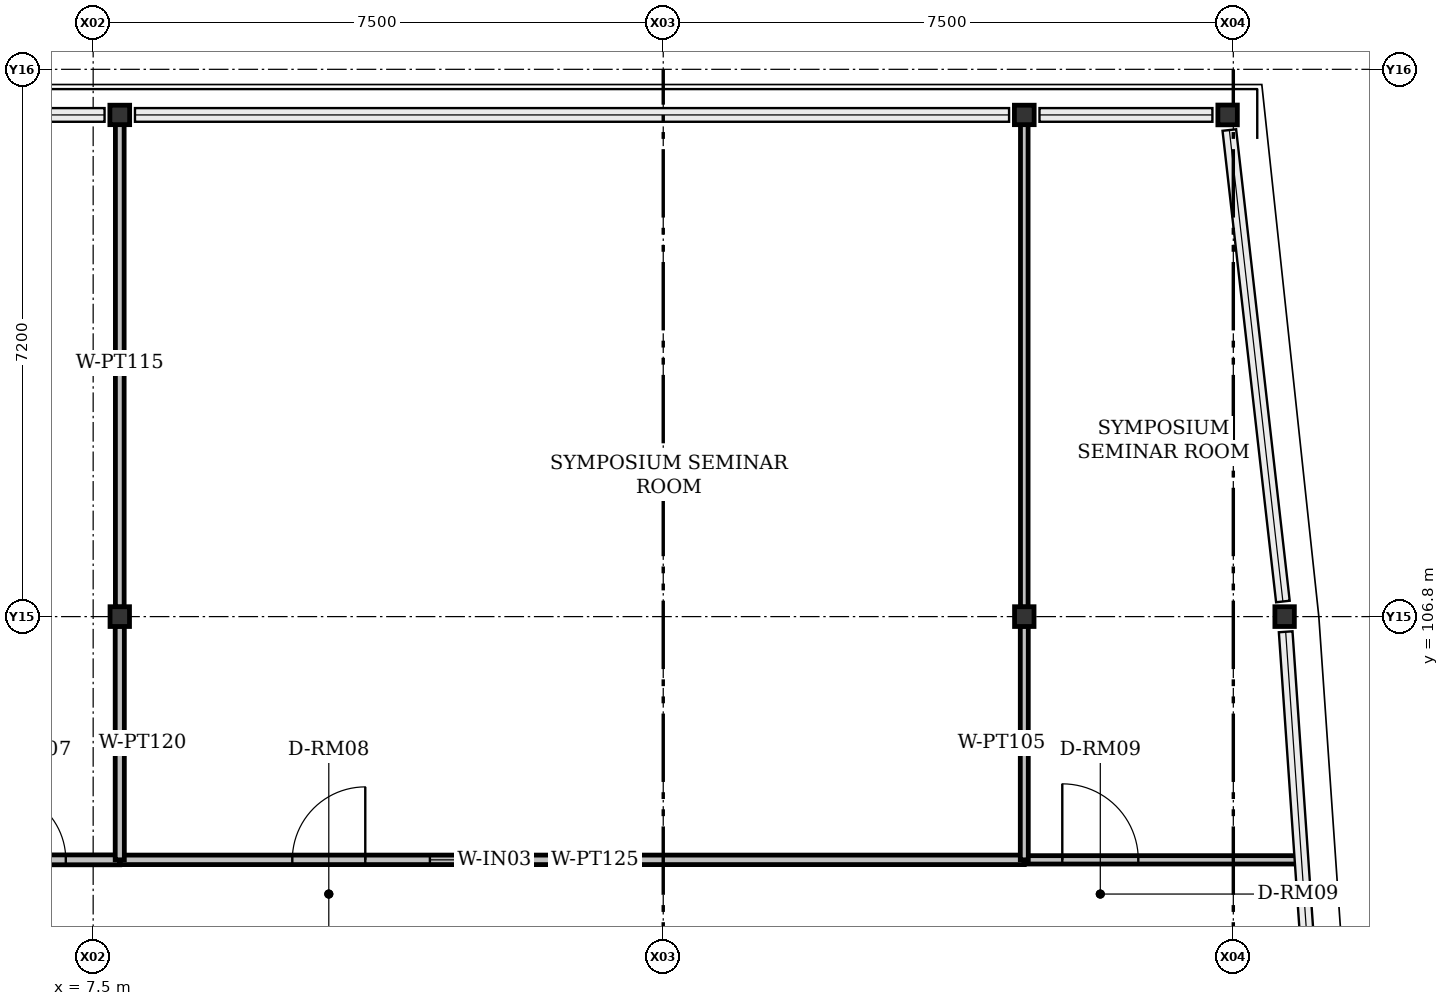
"""IFC4 building model, lengths in metres.
Left out: names, types, materials, properties, quantities, classifications, styles, units other than length and angle.
Written with IfcOpenShell. Run it as: python <this file> out.ifc"""

import sys

from ifc_helpers import new_model, si_unit, direction, frame, frame_2d, origin, origin_2d, place, context, subcontext, project, spatial, rectangle, i_section, extrude, element, fill, save


model = new_model("IFC4")
c1 = context("Model", 3, precision=1e-05, world=origin(), true_north=direction((0.0, 1.0)))
c2 = subcontext(c1, "Body", "Model", "MODEL_VIEW")
j1 = project(units=[si_unit("LENGTHUNIT", "METRE"), si_unit("PLANEANGLEUNIT", "RADIAN")], contexts=[c1])
p1 = place(None, origin())
s1 = spatial("IfcSite", under=j1, at=p1, CompositionType="ELEMENT")
p2 = place(p1, origin())
s2 = spatial("IfcBuilding", under=s1, at=p2, CompositionType="ELEMENT")
p3 = place(p2, frame((0.0, 0.0, 60.3)))
s3 = spatial("IfcBuildingStorey", under=s2, at=p3, CompositionType="ELEMENT", Elevation=60.3)
for number, where, z_axis, x_axis in (
    (1, (7.85, 106.8, 0.0), (0.0, 0.0, 1.0), (1.0, 0.0, 0.0)),
    (2, (19.75, 106.8, 0.0), (0.0, 0.0, 1.0), (1.0, 0.0, 0.0)),
    (3, (23.175, 106.8, 0.0), (0.0, 0.0, 1.0), (1.0, 0.0, 0.0)),
    (4, (7.85, 113.4, 0.0), (0.0, 0.0, 1.0), (0.0, 1.0, 0.0)),
    (5, (19.75, 113.4, 0.0), (0.0, 0.0, 1.0), (0.0, 1.0, 0.0)),
    (6, (22.425, 113.4, 0.0), (0.0, 0.0, 1.0), (1.0, 0.0, 0.0)),
):
    element("IfcColumn", number, at=place(p3, frame(where, z_axis=z_axis, x_axis=x_axis)), inside=s3, PredefinedType="COLUMN", context=c2, shape_type="SweptSolid", body=[
        extrude(i_section(OverallWidth=0.256, OverallDepth=0.26, WebThickness=0.011, FlangeThickness=0.017, FilletRadius=0.013, at=origin_2d()), origin(), (0.0, 0.0, 1.0), 4.2),
    ])
p4 = place(p3, frame((0.65, 103.6, 0.0), z_axis=(0.0, 0.0, 1.0), x_axis=(1.0, 0.0, 0.0)))
e7 = element("IfcWall", 7, at=p4, inside=s3, PredefinedType="PARTITIONING", context=c2, shape_type="SweptSolid", body=[
    extrude(rectangle(XDim=7.2, YDim=0.13, at=frame_2d((3.6, 0.0))), origin(), (0.0, 0.0, 1.0), 3.527),
])
p5 = place(p4, frame((5.57, 0.0, 0.0)))
e8 = element("IfcOpeningElement", 8, at=p5, cuts=e7, PredefinedType="OPENING", context=c2, shape_type="SweptSolid", body=[
    extrude(rectangle(XDim=0.92, YDim=2.15, at=frame_2d((0.46, 1.075))), frame((0.0, 0.065, 0.0), z_axis=(0.0, -1.0, 0.0), x_axis=(1.0, 0.0, 0.0)), (0.0, 0.0, 1.0), 0.13),
])
p6 = place(p3, frame((7.85, 103.6, 0.0), z_axis=(0.0, 0.0, 1.0), x_axis=(1.0, 0.0, 0.0)))
e9 = element("IfcWall", 9, at=p6, inside=s3, PredefinedType="PARTITIONING", context=c2, shape_type="SweptSolid", body=[
    extrude(rectangle(XDim=11.9, YDim=0.125, at=frame_2d((5.95, 0.0))), origin(), (0.0, 0.0, 1.0), 3.527),
])
p7 = place(p6, frame((2.27, 0.0, 0.0)))
e10 = element("IfcOpeningElement", 10, at=p7, cuts=e9, PredefinedType="OPENING", context=c2, shape_type="SweptSolid", body=[
    extrude(rectangle(XDim=0.96, YDim=2.15, at=frame_2d((0.48, 1.075))), frame((0.0, 0.062, 0.0), z_axis=(0.0, -1.0, 0.0), x_axis=(1.0, 0.0, 0.0)), (0.0, 0.0, 1.0), 0.125),
])
p8 = place(p6, frame((4.08, 0.0, 0.92)))
e11 = element("IfcOpeningElement", 11, at=p8, cuts=e9, PredefinedType="OPENING", context=c2, shape_type="SweptSolid", body=[
    extrude(rectangle(XDim=1.1, YDim=1.1, at=frame_2d((0.55, 0.55))), frame((0.0, 0.062, 0.0), z_axis=(0.0, -1.0, 0.0), x_axis=(1.0, 0.0, 0.0)), (0.0, 0.0, 1.0), 0.125),
])
p9 = place(p3, frame((7.85, 106.675, 0.0), z_axis=(0.0, 0.0, 1.0), x_axis=(0.0, -1.0, 0.0)))
e12 = element("IfcWall", 12, at=p9, inside=s3, PredefinedType="PARTITIONING", context=c2, shape_type="SweptSolid", body=[
    extrude(rectangle(XDim=3.075, YDim=0.12, at=frame_2d((1.538, 0.0))), origin(), (0.0, 0.0, 1.0), 3.527),
])
p10 = place(p3, frame((7.85, 113.35, 0.0), z_axis=(0.0, 0.0, 1.0), x_axis=(0.0, -1.0, 0.0)))
e13 = element("IfcWall", 13, at=p10, inside=s3, PredefinedType="PARTITIONING", context=c2, shape_type="SweptSolid", body=[
    extrude(rectangle(XDim=6.425, YDim=0.115, at=frame_2d((3.212, 0.0))), origin(), (0.0, 0.0, 1.0), 3.527),
])
p11 = place(p3, frame((19.75, 103.6, 0.0), z_axis=(0.0, 0.0, 1.0), x_axis=(1.0, 0.0, 0.0)))
e14 = element("IfcWall", 14, at=p11, inside=s3, PredefinedType="PARTITIONING", context=c2, shape_type="SweptSolid", body=[
    extrude(rectangle(XDim=3.665, YDim=0.11, at=frame_2d((1.833, 0.0))), origin(), (0.0, 0.0, 1.0), 3.527),
])
p12 = place(p11, frame((0.5, 0.0, 0.0)))
e15 = element("IfcOpeningElement", 15, at=p12, cuts=e14, PredefinedType="OPENING", context=c2, shape_type="SweptSolid", body=[
    extrude(rectangle(XDim=1.0, YDim=2.15, at=frame_2d((0.5, 1.075))), frame((0.0, 0.055, 0.0), z_axis=(0.0, -1.0, 0.0), x_axis=(1.0, 0.0, 0.0)), (0.0, 0.0, 1.0), 0.11),
])
p13 = place(p3, frame((19.75, 106.675, 0.0), z_axis=(0.0, 0.0, 1.0), x_axis=(0.0, -1.0, 0.0)))
e16 = element("IfcWall", 16, at=p13, inside=s3, PredefinedType="PARTITIONING", context=c2, shape_type="SweptSolid", body=[
    extrude(rectangle(XDim=3.075, YDim=0.105, at=frame_2d((1.538, 0.0))), origin(), (0.0, 0.0, 1.0), 3.527),
])
p14 = place(p3, frame((19.75, 113.35, 0.0), z_axis=(0.0, 0.0, 1.0), x_axis=(0.0, -1.0, 0.0)))
e17 = element("IfcWall", 17, at=p14, inside=s3, PredefinedType="PARTITIONING", context=c2, shape_type="SweptSolid", body=[
    extrude(rectangle(XDim=6.425, YDim=0.1, at=frame_2d((3.212, 0.0))), origin(), (0.0, 0.0, 1.0), 3.527),
])
p15 = place(p5, origin())
e18 = element("IfcDoor", 18, at=p15, inside=s3, OperationType="SINGLE_SWING_LEFT", PredefinedType="DOOR", context=c2, shape_type="SweptSolid", body=[
    extrude(rectangle(XDim=0.92, YDim=2.15, at=frame_2d((0.46, 1.075))), frame((0.0, 0.025, 0.0), z_axis=(0.0, -1.0, 0.0), x_axis=(1.0, 0.0, 0.0)), (0.0, 0.0, 1.0), 0.05),
])
fill(e8, e18)
p16 = place(p7, origin())
e19 = element("IfcDoor", 19, at=p16, inside=s3, OperationType="SINGLE_SWING_RIGHT", PredefinedType="DOOR", context=c2, shape_type="SweptSolid", body=[
    extrude(rectangle(XDim=0.96, YDim=2.15, at=frame_2d((0.48, 1.075))), frame((0.0, 0.025, 0.0), z_axis=(0.0, -1.0, 0.0), x_axis=(1.0, 0.0, 0.0)), (0.0, 0.0, 1.0), 0.05),
])
fill(e10, e19)
p17 = place(p8, origin())
e20 = element("IfcWindow", 20, at=p17, inside=s3, PartitioningType="SINGLE_PANEL", PredefinedType="WINDOW", context=c2, shape_type="SweptSolid", body=[
    extrude(rectangle(XDim=1.1, YDim=1.1, at=frame_2d((0.55, 0.55))), frame((0.0, 0.03, 0.0), z_axis=(0.0, -1.0, 0.0), x_axis=(1.0, 0.0, 0.0)), (0.0, 0.0, 1.0), 0.06),
])
fill(e11, e20)
p18 = place(p12, origin())
e21 = element("IfcDoor", 21, at=p18, inside=s3, OperationType="SINGLE_SWING_LEFT", PredefinedType="DOOR", context=c2, shape_type="SweptSolid", body=[
    extrude(rectangle(XDim=1.0, YDim=2.15, at=frame_2d((0.5, 1.075))), frame((0.0, 0.025, 0.0), z_axis=(0.0, -1.0, 0.0), x_axis=(1.0, 0.0, 0.0)), (0.0, 0.0, 1.0), 0.05),
])
fill(e15, e21)
save(model, sys.argv[1])
